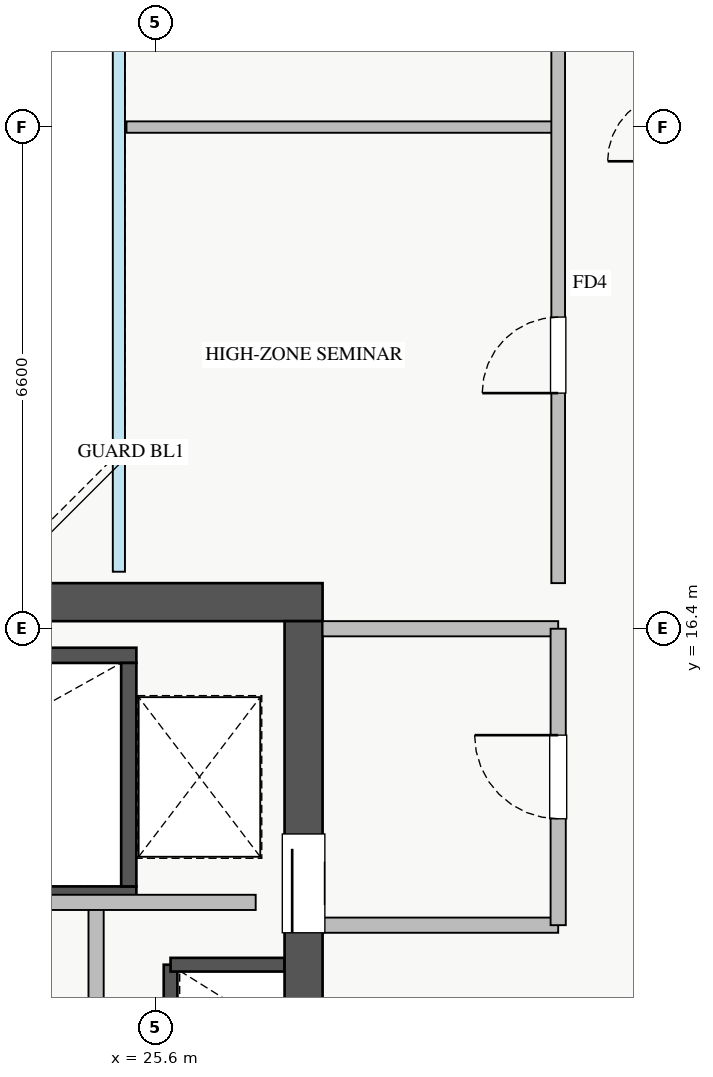
"""IFC4 building model, lengths in metres.
Left out: names, types, materials, properties, quantities, classifications, styles, units other than length and angle.
Written with IfcOpenShell. Run it as: python <this file> out.ifc"""

import sys

from ifc_helpers import new_model, si_unit, direction, frame, frame_2d, origin, place, context, subcontext, project, spatial, rectangle, extrude, source, transform, mapped, element, fill, save


model = new_model("IFC4")
c1 = context("Model", 3, precision=1e-05, world=origin(), true_north=direction((0.0, 1.0)))
c2 = subcontext(c1, "Body", "Model", "MODEL_VIEW")
j1 = project(units=[si_unit("LENGTHUNIT", "METRE"), si_unit("PLANEANGLEUNIT", "RADIAN")], contexts=[c1])
p1 = place(None, origin())
s1 = spatial("IfcSite", under=j1, at=p1, CompositionType="ELEMENT")
p2 = place(p1, origin())
s2 = spatial("IfcBuilding", under=s1, at=p2, CompositionType="ELEMENT")
p3 = place(p2, frame((0.0, 0.0, 226.25)))
s3 = spatial("IfcBuildingStorey", under=s2, at=p3, CompositionType="ELEMENT", Elevation=226.25)
p4 = place(p3, frame((25.8, 10.92, 0.0), z_axis=(0.0, 0.0, 1.0), x_axis=(0.0, 1.0, 0.0)))
e1 = element("IfcWall", 1, at=p4, inside=s3, PredefinedType="SHEAR", context=c2, shape_type="SweptSolid", body=[
    extrude(rectangle(XDim=1.06, YDim=0.18, at=frame_2d((0.53, 0.0))), origin(), (0.0, 0.0, 1.0), 3.07),
])
p5 = place(p3, frame((25.8, 11.98, 0.0), z_axis=(0.0, 0.0, 1.0), x_axis=(1.0, 0.0, 0.0)))
e2 = element("IfcWall", 2, at=p5, inside=s3, PredefinedType="SHEAR", context=c2, shape_type="SweptSolid", body=[
    extrude(rectangle(XDim=1.5, YDim=0.18, at=frame_2d((0.75, 0.0))), origin(), (0.0, 0.0, 1.0), 3.07),
])
p6 = place(p3, frame((18.2, 12.91, 0.0), z_axis=(0.0, 0.0, 1.0), x_axis=(1.0, 0.0, 0.0)))
e3 = element("IfcWall", 3, at=p6, inside=s3, PredefinedType="SHEAR", context=c2, shape_type="SweptSolid", body=[
    extrude(rectangle(XDim=7.15, YDim=0.2, at=frame_2d((3.575, 0.0))), origin(), (0.0, 0.0, 1.0), 3.25),
])
p7 = place(p6, frame((0.35, 0.0, 0.0)))
e4 = element("IfcOpeningElement", 4, at=p7, cuts=e3, PredefinedType="OPENING", context=c2, shape_type="SweptSolid", body=[
    extrude(rectangle(XDim=1.1, YDim=2.05, at=frame_2d((0.55, 1.025))), frame((0.0, 0.11, 0.0), z_axis=(0.0, -1.0, 0.0), x_axis=(1.0, 0.0, 0.0)), (0.0, 0.0, 1.0), 0.22),
])
p8 = place(p3, frame((18.2, 16.05, 0.0), z_axis=(0.0, 0.0, 1.0), x_axis=(1.0, 0.0, 0.0)))
e5 = element("IfcWall", 5, at=p8, inside=s3, PredefinedType="SHEAR", context=c2, shape_type="SweptSolid", body=[
    extrude(rectangle(XDim=7.15, YDim=0.2, at=frame_2d((3.575, 0.0))), origin(), (0.0, 0.0, 1.0), 3.25),
])
p9 = place(p3, frame((25.25, 13.01, 0.0), z_axis=(0.0, 0.0, 1.0), x_axis=(0.0, 1.0, 0.0)))
e6 = element("IfcWall", 6, at=p9, inside=s3, PredefinedType="SHEAR", context=c2, shape_type="SweptSolid", body=[
    extrude(rectangle(XDim=2.94, YDim=0.2, at=frame_2d((1.47, 0.0))), origin(), (0.0, 0.0, 1.0), 3.25),
])
p10 = place(p3, frame((10.2, 16.75, 0.0), z_axis=(0.0, 0.0, 1.0), x_axis=(1.0, 0.0, 0.0)))
e7 = element("IfcWall", 7, at=p10, inside=s3, PredefinedType="SHEAR", context=c2, shape_type="SweptSolid", body=[
    extrude(rectangle(XDim=17.6, YDim=0.5, at=frame_2d((8.8, 0.0))), origin(), (0.0, 0.0, 1.0), 3.25),
])
p11 = place(p3, frame((27.55, 10.3, 0.0), z_axis=(0.0, 0.0, 1.0), x_axis=(0.0, 1.0, 0.0)))
e8 = element("IfcWall", 8, at=p11, inside=s3, PredefinedType="SHEAR", context=c2, shape_type="SweptSolid", body=[
    extrude(rectangle(XDim=6.2, YDim=0.5, at=frame_2d((3.1, 0.0))), origin(), (0.0, 0.0, 1.0), 3.25),
])
p12 = place(p11, frame((2.1, 0.0, 0.0)))
e9 = element("IfcOpeningElement", 9, at=p12, cuts=e8, PredefinedType="OPENING", context=c2, shape_type="SweptSolid", body=[
    extrude(rectangle(XDim=1.3, YDim=2.05, at=frame_2d((0.65, 1.025))), frame((0.0, 0.26, 0.0), z_axis=(0.0, -1.0, 0.0), x_axis=(1.0, 0.0, 0.0)), (0.0, 0.0, 1.0), 0.52),
])
p13 = place(p3, frame((27.8, 16.4, 0.0), z_axis=(0.0, 0.0, 1.0), x_axis=(1.0, 0.0, 0.0)))
e10 = element("IfcWall", 10, at=p13, inside=s3, PredefinedType="PARTITIONING", context=c2, shape_type="SweptSolid", body=[
    extrude(rectangle(XDim=3.1, YDim=0.2, at=frame_2d((1.55, 0.0))), origin(), (0.0, 0.0, 1.0), 3.07),
])
p14 = place(p3, frame((27.8, 12.5, 0.0), z_axis=(0.0, 0.0, 1.0), x_axis=(1.0, 0.0, 0.0)))
e11 = element("IfcWall", 11, at=p14, inside=s3, PredefinedType="PARTITIONING", context=c2, shape_type="SweptSolid", body=[
    extrude(rectangle(XDim=3.1, YDim=0.2, at=frame_2d((1.55, 0.0))), origin(), (0.0, 0.0, 1.0), 2.265),
])
p15 = place(p3, frame((30.9, 12.5, 0.0), z_axis=(0.0, 0.0, 1.0), x_axis=(0.0, 1.0, 0.0)))
e12 = element("IfcWall", 12, at=p15, inside=s3, PredefinedType="PARTITIONING", context=c2, shape_type="SweptSolid", body=[
    extrude(rectangle(XDim=3.9, YDim=0.2, at=frame_2d((1.95, 0.0))), origin(), (0.0, 0.0, 1.0), 3.07),
])
p16 = place(p15, frame((1.4, 0.0, 0.0)))
e13 = element("IfcOpeningElement", 13, at=p16, cuts=e12, PredefinedType="OPENING", context=c2, shape_type="SweptSolid", body=[
    extrude(rectangle(XDim=1.1, YDim=2.05, at=frame_2d((0.55, 1.025))), frame((0.0, 0.11, 0.0), z_axis=(0.0, -1.0, 0.0), x_axis=(1.0, 0.0, 0.0)), (0.0, 0.0, 1.0), 0.22),
])
p17 = place(p3, frame((24.82, 10.15, 0.0), z_axis=(0.0, 0.0, 1.0), x_axis=(0.0, 1.0, 0.0)))
e14 = element("IfcWall", 14, at=p17, inside=s3, PredefinedType="PARTITIONING", context=c2, shape_type="SweptSolid", body=[
    extrude(rectangle(XDim=2.65, YDim=0.2, at=frame_2d((1.325, 0.0))), origin(), (0.0, 0.0, 1.0), 3.07),
])
p18 = place(p3, frame((21.75, 12.8, 0.0), z_axis=(0.0, 0.0, 1.0), x_axis=(1.0, 0.0, 0.0)))
e15 = element("IfcWall", 15, at=p18, inside=s3, PredefinedType="PARTITIONING", context=c2, shape_type="SweptSolid", body=[
    extrude(rectangle(XDim=5.17, YDim=0.2, at=frame_2d((2.585, 0.0))), origin(), (0.0, 0.0, 1.0), 3.07),
])
p19 = place(p3, frame((25.22, 23.0, 0.0), z_axis=(0.0, 0.0, 1.0), x_axis=(1.0, 0.0, 0.0)))
e16 = element("IfcWall", 16, at=p19, inside=s3, PredefinedType="PARTITIONING", context=c2, shape_type="SweptSolid", body=[
    extrude(rectangle(XDim=5.68, YDim=0.15, at=frame_2d((2.84, 0.0))), origin(), (0.0, 0.0, 1.0), 3.07),
])
p20 = place(p3, frame((30.9, 17.0, 0.0), z_axis=(0.0, 0.0, 1.0), x_axis=(0.0, 1.0, 0.0)))
e17 = element("IfcWall", 17, at=p20, inside=s3, PredefinedType="PARTITIONING", context=c2, shape_type="SweptSolid", body=[
    extrude(rectangle(XDim=12.0, YDim=0.18, at=frame_2d((6.0, 0.0))), origin(), (0.0, 0.0, 1.0), 3.07),
])
p21 = place(p20, frame((2.5, 0.0, 0.0)))
e18 = element("IfcOpeningElement", 18, at=p21, cuts=e17, PredefinedType="OPENING", context=c2, shape_type="SweptSolid", body=[
    extrude(rectangle(XDim=1.0, YDim=2.05, at=frame_2d((0.5, 1.025))), frame((0.0, 0.1, 0.0), z_axis=(0.0, -1.0, 0.0), x_axis=(1.0, 0.0, 0.0)), (0.0, 0.0, 1.0), 0.2),
])
p22 = place(p20, frame((8.5, 0.0, 0.0)))
e19 = element("IfcOpeningElement", 19, at=p22, cuts=e17, PredefinedType="OPENING", context=c2, shape_type="SweptSolid", body=[
    extrude(rectangle(XDim=1.0, YDim=2.05, at=frame_2d((0.5, 1.025))), frame((0.0, 0.1, 0.0), z_axis=(0.0, -1.0, 0.0), x_axis=(1.0, 0.0, 0.0)), (0.0, 0.0, 1.0), 0.2),
])
m1 = source(origin(), c2, "Body", "SweptSolid", [
    extrude(rectangle(XDim=1.3, YDim=2.05, at=frame_2d((0.65, 1.025))), frame((0.0, 0.025, 0.0), z_axis=(0.0, -1.0, 0.0), x_axis=(1.0, 0.0, 0.0)), (0.0, 0.0, 1.0), 0.05),
])
p23 = place(p12, origin())
e20 = element("IfcDoor", 20, at=p23, inside=s3, OperationType="SLIDING_TO_RIGHT", PredefinedType="DOOR", context=c2, shape_type="MappedRepresentation", body=[
    mapped(m1, transform((0.0, 0.0, 0.0), x_axis=(1.0, 0.0, 0.0), y_axis=(0.0, 1.0, 0.0), z_axis=(0.0, 0.0, 1.0), scale=1.0)),
])
fill(e9, e20)
m2 = source(origin(), c2, "Body", "SweptSolid", [
    extrude(rectangle(XDim=1.1, YDim=2.05, at=frame_2d((0.55, 1.025))), frame((0.0, 0.025, 0.0), z_axis=(0.0, -1.0, 0.0), x_axis=(1.0, 0.0, 0.0)), (0.0, 0.0, 1.0), 0.05),
])
p24 = place(p16, origin())
e21 = element("IfcDoor", 21, at=p24, inside=s3, OperationType="SINGLE_SWING_RIGHT", PredefinedType="DOOR", context=c2, shape_type="MappedRepresentation", body=[
    mapped(m2, transform((0.0, 0.0, 0.0), x_axis=(1.0, 0.0, 0.0), y_axis=(0.0, 1.0, 0.0), z_axis=(0.0, 0.0, 1.0), scale=1.0)),
])
fill(e13, e21)
m3 = source(origin(), c2, "Body", "SweptSolid", [
    extrude(rectangle(XDim=1.0, YDim=2.05, at=frame_2d((0.5, 1.025))), frame((0.0, 0.025, 0.0), z_axis=(0.0, -1.0, 0.0), x_axis=(1.0, 0.0, 0.0)), (0.0, 0.0, 1.0), 0.05),
])
p25 = place(p21, origin())
e22 = element("IfcDoor", 22, at=p25, inside=s3, OperationType="SINGLE_SWING_LEFT", PredefinedType="DOOR", context=c2, shape_type="MappedRepresentation", body=[
    mapped(m3, transform((0.0, 0.0, 0.0), x_axis=(1.0, 0.0, 0.0), y_axis=(0.0, 1.0, 0.0), z_axis=(0.0, 0.0, 1.0), scale=1.0)),
])
fill(e18, e22)
save(model, sys.argv[1])
